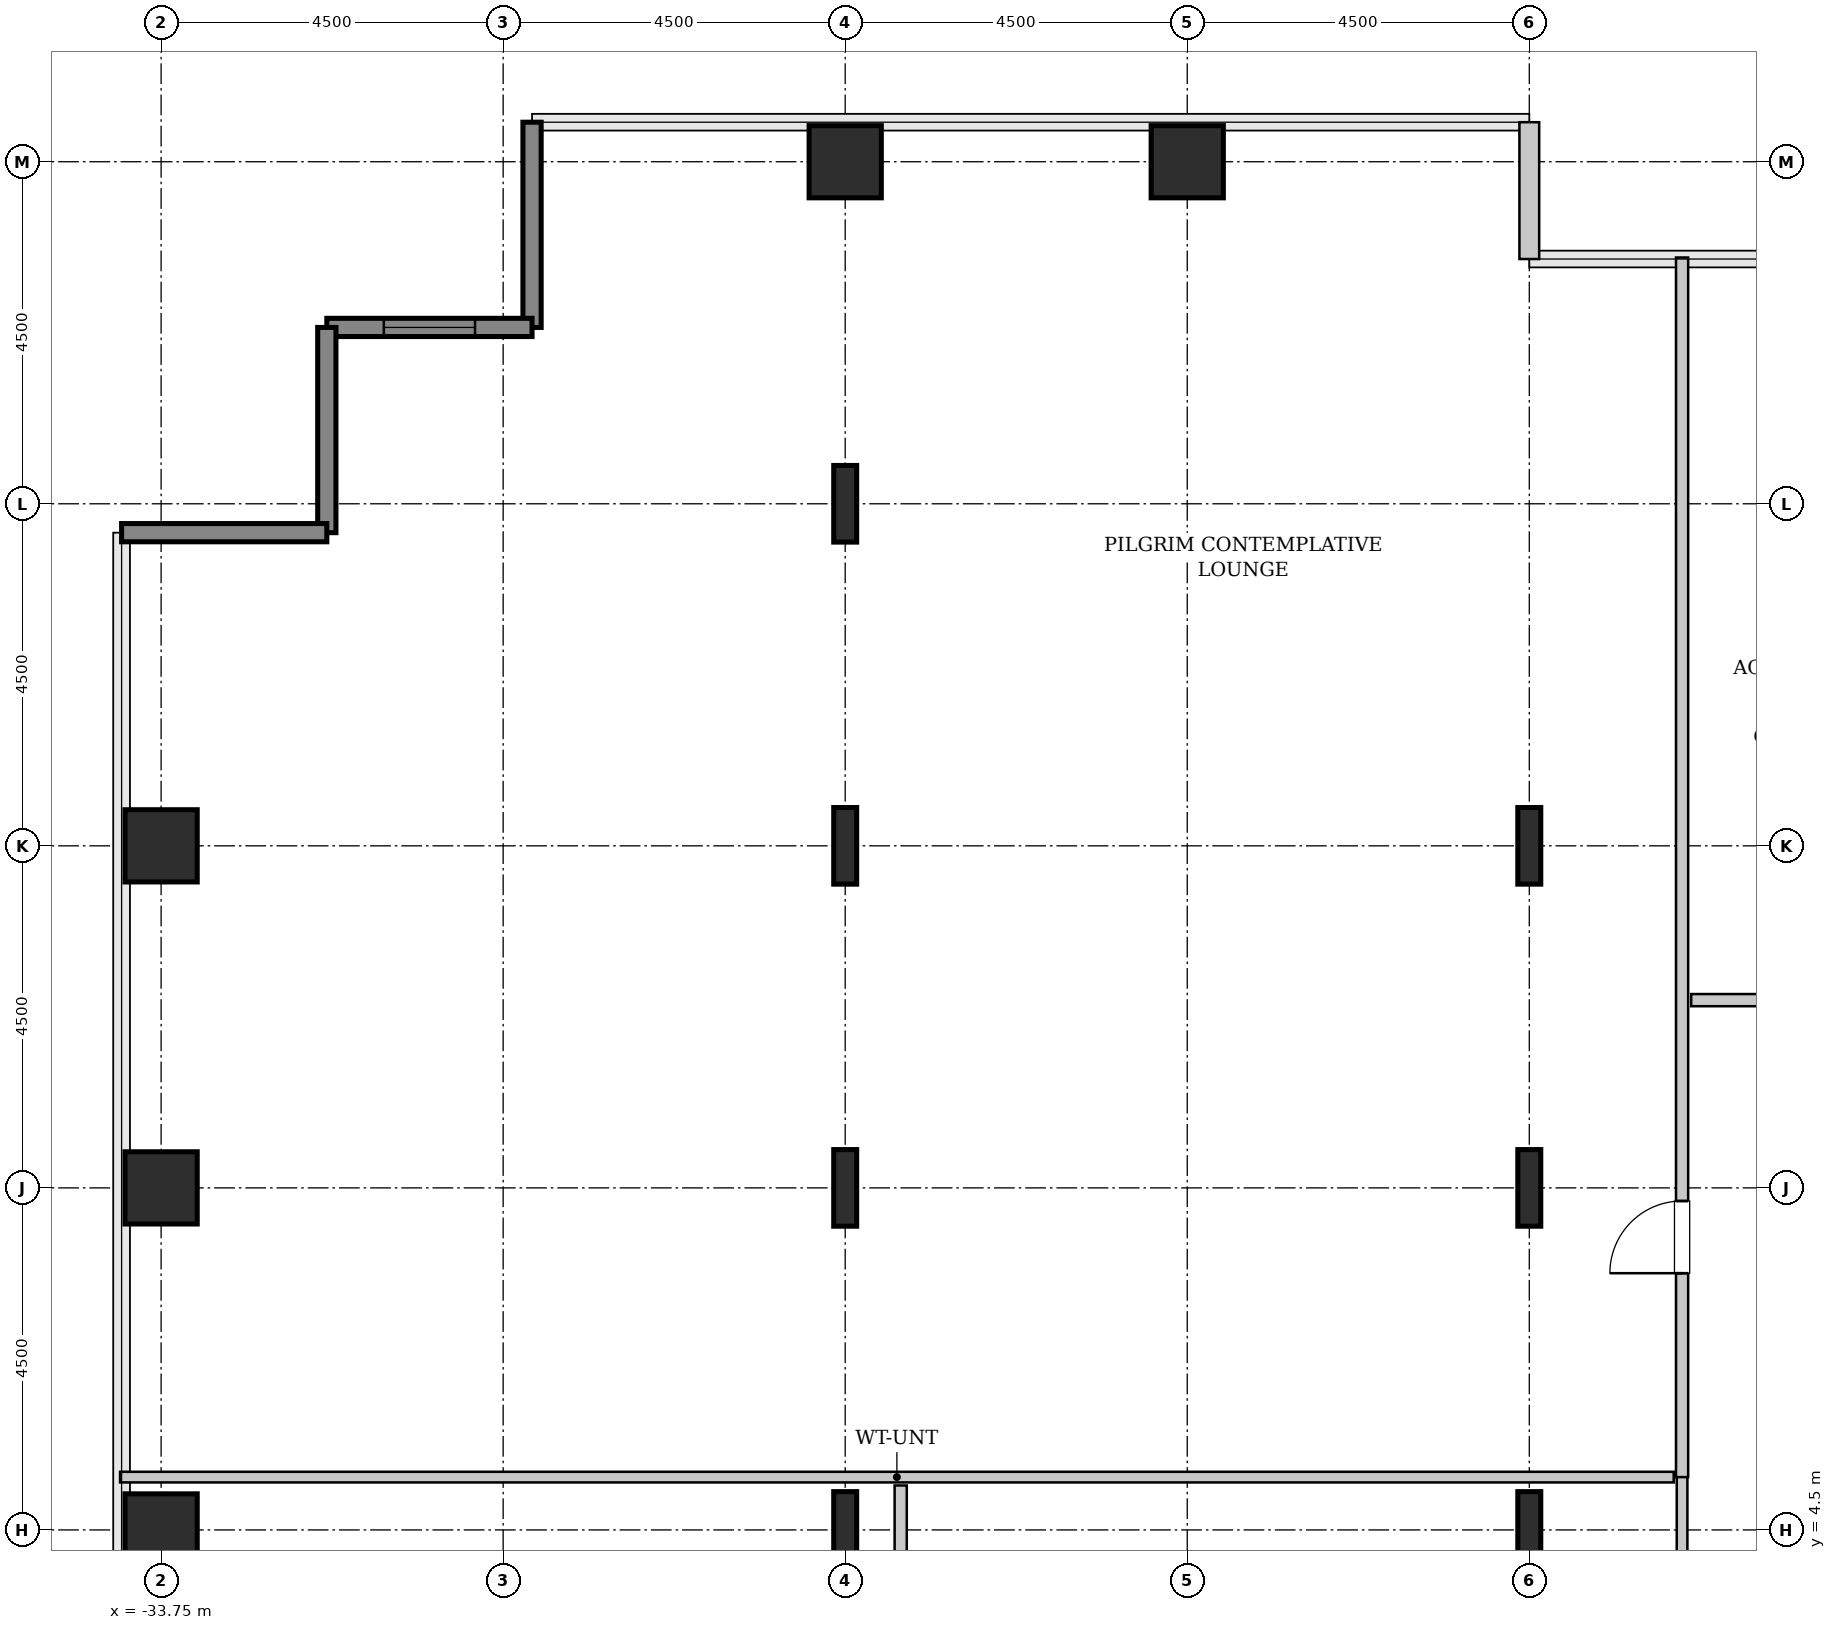
"""IFC4 building model, lengths in metres.
Left out: names, types, materials, properties, quantities, classifications, styles, units other than length and angle.
Written with IfcOpenShell. Run it as: python <this file> out.ifc"""

import sys

from ifc_helpers import new_model, si_unit, direction, frame, frame_2d, origin, origin_2d, place, context, subcontext, project, spatial, rectangle, hollow_rectangle, i_section, extrude, source, transform, mapped, element, fill, save


model = new_model("IFC4")
c1 = context("Model", 3, precision=1e-05, world=origin(), true_north=direction((0.0, 1.0)))
c2 = subcontext(c1, "Body", "Model", "MODEL_VIEW")
j1 = project(units=[si_unit("LENGTHUNIT", "METRE"), si_unit("PLANEANGLEUNIT", "RADIAN")], contexts=[c1])
p1 = place(None, origin())
s1 = spatial("IfcSite", under=j1, at=p1, CompositionType="ELEMENT")
p2 = place(p1, origin())
s2 = spatial("IfcBuilding", under=s1, at=p2, CompositionType="ELEMENT")
p3 = place(p2, frame((0.0, 0.0, 36.8)))
s3 = spatial("IfcBuildingStorey", under=s2, at=p3, CompositionType="ELEMENT", Elevation=36.8)
m1 = source(origin(), c2, "Body", "SweptSolid", [
    extrude(hollow_rectangle(XDim=0.95, YDim=0.95, WallThickness=0.045, InnerFilletRadius=0.045, OuterFilletRadius=0.09, at=origin_2d()), origin(), (0.0, 0.0, 1.0), 3.8),
])
for number, where, z_axis, x_axis in (
    (1, (-33.75, 4.5, 0.0), (0.0, 0.0, 1.0), (1.0, 0.0, 0.0)),
    (2, (-33.75, 9.0, 0.0), (0.0, 0.0, 1.0), (1.0, 0.0, 0.0)),
    (3, (-33.75, 13.5, 0.0), (0.0, 0.0, 1.0), (1.0, 0.0, 0.0)),
):
    element("IfcColumn", number, at=place(p3, frame(where, z_axis=z_axis, x_axis=x_axis)), inside=s3, PredefinedType="COLUMN", context=c2, shape_type="MappedRepresentation", body=[
        mapped(m1, transform((0.0, 0.0, 0.0), x_axis=(1.0, 0.0, 0.0), y_axis=(0.0, 1.0, 0.0), z_axis=(0.0, 0.0, 1.0), scale=1.0)),
    ])
m2 = source(origin(), c2, "Body", "SweptSolid", [
    extrude(i_section(OverallWidth=0.302, OverallDepth=1.008, WebThickness=0.021, FlangeThickness=0.04, FilletRadius=0.03, at=origin_2d()), origin(), (0.0, 0.0, 1.0), 3.8),
])
for number, where, z_axis, x_axis in (
    (4, (-24.75, 4.5, 0.0), (0.0, 0.0, 1.0), (1.0, 0.0, 0.0)),
    (5, (-24.75, 9.0, 0.0), (0.0, 0.0, 1.0), (1.0, 0.0, 0.0)),
    (6, (-24.75, 13.5, 0.0), (0.0, 0.0, 1.0), (1.0, 0.0, 0.0)),
    (7, (-24.75, 18.0, 0.0), (0.0, 0.0, 1.0), (1.0, 0.0, 0.0)),
):
    element("IfcColumn", number, at=place(p3, frame(where, z_axis=z_axis, x_axis=x_axis)), inside=s3, PredefinedType="COLUMN", context=c2, shape_type="MappedRepresentation", body=[
        mapped(m2, transform((0.0, 0.0, 0.0), x_axis=(1.0, 0.0, 0.0), y_axis=(0.0, 1.0, 0.0), z_axis=(0.0, 0.0, 1.0), scale=1.0)),
    ])
for number, where, z_axis, x_axis in (
    (8, (-24.75, 22.5, 0.0), (0.0, 0.0, 1.0), (1.0, 0.0, 0.0)),
    (9, (-20.25, 22.5, 0.0), (0.0, 0.0, 1.0), (1.0, 0.0, 0.0)),
):
    element("IfcColumn", number, at=place(p3, frame(where, z_axis=z_axis, x_axis=x_axis)), inside=s3, PredefinedType="COLUMN", context=c2, shape_type="MappedRepresentation", body=[
        mapped(m1, transform((0.0, 0.0, 0.0), x_axis=(1.0, 0.0, 0.0), y_axis=(0.0, 1.0, 0.0), z_axis=(0.0, 0.0, 1.0), scale=1.0)),
    ])
for number, where, z_axis, x_axis in (
    (10, (-15.75, 4.5, 0.0), (0.0, 0.0, 1.0), (1.0, 0.0, 0.0)),
    (11, (-15.75, 9.0, 0.0), (0.0, 0.0, 1.0), (1.0, 0.0, 0.0)),
    (12, (-15.75, 13.5, 0.0), (0.0, 0.0, 1.0), (1.0, 0.0, 0.0)),
):
    element("IfcColumn", number, at=place(p3, frame(where, z_axis=z_axis, x_axis=x_axis)), inside=s3, PredefinedType="COLUMN", context=c2, shape_type="MappedRepresentation", body=[
        mapped(m2, transform((0.0, 0.0, 0.0), x_axis=(1.0, 0.0, 0.0), y_axis=(0.0, 1.0, 0.0), z_axis=(0.0, 0.0, 1.0), scale=1.0)),
    ])
m3 = source(origin(), c2, "Body", "SweptSolid", [
    extrude(rectangle(XDim=1.8, YDim=0.26, at=frame_2d((0.9, 0.0))), origin(), (0.0, 0.0, 1.0), 3.55),
])
p4 = place(p3, frame((-15.75, 21.22, 0.0), z_axis=(0.0, 0.0, 1.0), x_axis=(0.0, 1.0, 0.0)))
e13 = element("IfcWall", 13, at=p4, inside=s3, PredefinedType="SOLIDWALL", context=c2, shape_type="MappedRepresentation", body=[
    mapped(m3, transform((0.0, 0.0, 0.0), x_axis=(1.0, 0.0, 0.0), y_axis=(0.0, 1.0, 0.0), z_axis=(0.0, 0.0, 1.0), scale=1.0)),
])
m4 = source(origin(), c2, "Body", "SweptSolid", [
    extrude(rectangle(XDim=2.7, YDim=0.24, at=frame_2d((1.35, 0.0))), origin(), (0.0, 0.0, 1.0), 3.55),
])
p5 = place(p3, frame((-28.87, 23.02, 0.0), z_axis=(0.0, 0.0, 1.0), x_axis=(0.0, -1.0, 0.0)))
e14 = element("IfcWall", 14, at=p5, inside=s3, PredefinedType="SHEAR", context=c2, shape_type="MappedRepresentation", body=[
    mapped(m4, transform((0.0, 0.0, 0.0), x_axis=(1.0, 0.0, 0.0), y_axis=(0.0, 1.0, 0.0), z_axis=(0.0, 0.0, 1.0), scale=1.0)),
])
p6 = place(p3, frame((-28.87, 20.32, 0.0), z_axis=(0.0, 0.0, 1.0), x_axis=(-1.0, 0.0, 0.0)))
e15 = element("IfcWall", 15, at=p6, inside=s3, PredefinedType="SHEAR", context=c2, shape_type="MappedRepresentation", body=[
    mapped(m4, transform((0.0, 0.0, 0.0), x_axis=(1.0, 0.0, 0.0), y_axis=(0.0, 1.0, 0.0), z_axis=(0.0, 0.0, 1.0), scale=1.0)),
])
p7 = place(p6, frame((0.75, 0.0, 0.85)))
e16 = element("IfcOpeningElement", 16, at=p7, cuts=e15, PredefinedType="OPENING", context=c2, shape_type="SweptSolid", body=[
    extrude(rectangle(XDim=1.2, YDim=1.8, at=frame_2d((0.6, 0.9))), frame((0.0, 0.13, 0.0), z_axis=(0.0, -1.0, 0.0), x_axis=(1.0, 0.0, 0.0)), (0.0, 0.0, 1.0), 0.26),
])
for number, where, z_axis, x_axis in (
    (17, (-31.57, 20.32, 0.0), (0.0, 0.0, 1.0), (0.0, -1.0, 0.0)),
    (18, (-31.57, 17.62, 0.0), (0.0, 0.0, 1.0), (-1.0, 0.0, 0.0)),
):
    element("IfcWall", number, at=place(p3, frame(where, z_axis=z_axis, x_axis=x_axis)), inside=s3, PredefinedType="SHEAR", context=c2, shape_type="MappedRepresentation", body=[
        mapped(m4, transform((0.0, 0.0, 0.0), x_axis=(1.0, 0.0, 0.0), y_axis=(0.0, 1.0, 0.0), z_axis=(0.0, 0.0, 1.0), scale=1.0)),
    ])
m5 = source(origin(), c2, "Body", "SweptSolid", [
    extrude(rectangle(XDim=6.465, YDim=0.14, at=frame_2d((3.232, 0.0))), origin(), (0.0, 0.0, 1.0), 3.535),
])
p8 = place(p3, frame((-13.74, -1.26, 0.0), z_axis=(0.0, 0.0, 1.0), x_axis=(0.0, 1.0, 0.0)))
e19 = element("IfcWall", 19, at=p8, inside=s3, PredefinedType="PARTITIONING", context=c2, shape_type="MappedRepresentation", body=[
    mapped(m5, transform((0.0, 0.0, 0.0), x_axis=(1.0, 0.0, 0.0), y_axis=(0.0, 1.0, 0.0), z_axis=(0.0, 0.0, 1.0), scale=1.0)),
])
m6 = source(origin(), c2, "Body", "SweptSolid", [
    extrude(rectangle(XDim=20.44, YDim=0.14, at=frame_2d((10.22, 0.0))), origin(), (0.0, 0.0, 1.0), 3.535),
])
p9 = place(p3, frame((-34.29, 5.195, 0.0), z_axis=(0.0, 0.0, 1.0), x_axis=(1.0, 0.0, 0.0)))
e20 = element("IfcWall", 20, at=p9, inside=s3, PredefinedType="PARTITIONING", context=c2, shape_type="MappedRepresentation", body=[
    mapped(m6, transform((0.0, 0.0, 0.0), x_axis=(1.0, 0.0, 0.0), y_axis=(0.0, 1.0, 0.0), z_axis=(0.0, 0.0, 1.0), scale=1.0)),
])
m7 = source(origin(), c2, "Body", "SweptSolid", [
    extrude(rectangle(XDim=13.18, YDim=0.16, at=frame_2d((6.59, 0.0))), origin(), (0.0, 0.0, 1.0), 3.535),
])
p10 = place(p3, frame((-24.02, -8.095, 0.0), z_axis=(0.0, 0.0, 1.0), x_axis=(0.0, 1.0, 0.0)))
e21 = element("IfcWall", 21, at=p10, inside=s3, PredefinedType="PARTITIONING", context=c2, shape_type="MappedRepresentation", body=[
    mapped(m7, transform((0.0, 0.0, 0.0), x_axis=(1.0, 0.0, 0.0), y_axis=(0.0, 1.0, 0.0), z_axis=(0.0, 0.0, 1.0), scale=1.0)),
])
p11 = place(p10, frame((5.37, 0.0, 0.0)))
e22 = element("IfcOpeningElement", 22, at=p11, cuts=e21, PredefinedType="OPENING", context=c2, shape_type="SweptSolid", body=[
    extrude(rectangle(XDim=0.95, YDim=2.1, at=frame_2d((0.475, 1.05))), frame((0.0, 0.09, 0.0), z_axis=(0.0, -1.0, 0.0), x_axis=(1.0, 0.0, 0.0)), (0.0, 0.0, 1.0), 0.18),
])
m8 = source(origin(), c2, "Body", "SweptSolid", [
    extrude(rectangle(XDim=16.045, YDim=0.16, at=frame_2d((8.022, 0.0))), origin(), (0.0, 0.0, 1.0), 3.535),
])
p12 = place(p3, frame((-13.74, 5.195, 0.0), z_axis=(0.0, 0.0, 1.0), x_axis=(0.0, 1.0, 0.0)))
e23 = element("IfcWall", 23, at=p12, inside=s3, PredefinedType="PARTITIONING", context=c2, shape_type="MappedRepresentation", body=[
    mapped(m8, transform((0.0, 0.0, 0.0), x_axis=(1.0, 0.0, 0.0), y_axis=(0.0, 1.0, 0.0), z_axis=(0.0, 0.0, 1.0), scale=1.0)),
])
p13 = place(p12, frame((2.683, 0.0, 0.0)))
e24 = element("IfcOpeningElement", 24, at=p13, cuts=e23, PredefinedType="OPENING", context=c2, shape_type="SweptSolid", body=[
    extrude(rectangle(XDim=0.95, YDim=2.1, at=frame_2d((0.475, 1.05))), frame((0.0, 0.09, 0.0), z_axis=(0.0, -1.0, 0.0), x_axis=(1.0, 0.0, 0.0)), (0.0, 0.0, 1.0), 0.18),
])
m9 = source(origin(), c2, "Body", "SweptSolid", [
    extrude(rectangle(XDim=4.125, YDim=0.16, at=frame_2d((2.062, 0.0))), origin(), (0.0, 0.0, 1.0), 3.535),
])
p14 = place(p3, frame((-13.62, 11.47, 0.0), z_axis=(0.0, 0.0, 1.0), x_axis=(1.0, 0.0, 0.0)))
e25 = element("IfcWall", 25, at=p14, inside=s3, PredefinedType="PARTITIONING", context=c2, shape_type="MappedRepresentation", body=[
    mapped(m9, transform((0.0, 0.0, 0.0), x_axis=(1.0, 0.0, 0.0), y_axis=(0.0, 1.0, 0.0), z_axis=(0.0, 0.0, 1.0), scale=1.0)),
])
p15 = place(p14, frame((1.587, 0.0, 0.0)))
e26 = element("IfcOpeningElement", 26, at=p15, cuts=e25, PredefinedType="OPENING", context=c2, shape_type="SweptSolid", body=[
    extrude(rectangle(XDim=0.95, YDim=2.1, at=frame_2d((0.475, 1.05))), frame((0.0, 0.09, 0.0), z_axis=(0.0, -1.0, 0.0), x_axis=(1.0, 0.0, 0.0)), (0.0, 0.0, 1.0), 0.18),
])
m10 = source(origin(), c2, "Body", "SweptSolid", [
    extrude(rectangle(XDim=1.2, YDim=1.8, at=frame_2d((0.6, 0.9))), frame((0.0, 0.03, 0.0), z_axis=(0.0, -1.0, 0.0), x_axis=(1.0, 0.0, 0.0)), (0.0, 0.0, 1.0), 0.06),
])
p16 = place(p7, origin())
e27 = element("IfcWindow", 27, at=p16, inside=s3, PartitioningType="SINGLE_PANEL", PredefinedType="WINDOW", context=c2, shape_type="MappedRepresentation", body=[
    mapped(m10, transform((0.0, 0.0, 0.0), x_axis=(1.0, 0.0, 0.0), y_axis=(0.0, 1.0, 0.0), z_axis=(0.0, 0.0, 1.0), scale=1.0)),
])
fill(e16, e27)
m11 = source(origin(), c2, "Body", "SweptSolid", [
    extrude(rectangle(XDim=0.95, YDim=2.1, at=frame_2d((0.475, 1.05))), frame((0.0, 0.025, 0.0), z_axis=(0.0, -1.0, 0.0), x_axis=(1.0, 0.0, 0.0)), (0.0, 0.0, 1.0), 0.05),
])
p17 = place(p13, origin())
e28 = element("IfcDoor", 28, at=p17, inside=s3, OperationType="SINGLE_SWING_LEFT", PredefinedType="DOOR", context=c2, shape_type="MappedRepresentation", body=[
    mapped(m11, transform((0.0, 0.0, 0.0), x_axis=(1.0, 0.0, 0.0), y_axis=(0.0, 1.0, 0.0), z_axis=(0.0, 0.0, 1.0), scale=1.0)),
])
fill(e24, e28)
save(model, sys.argv[1])
